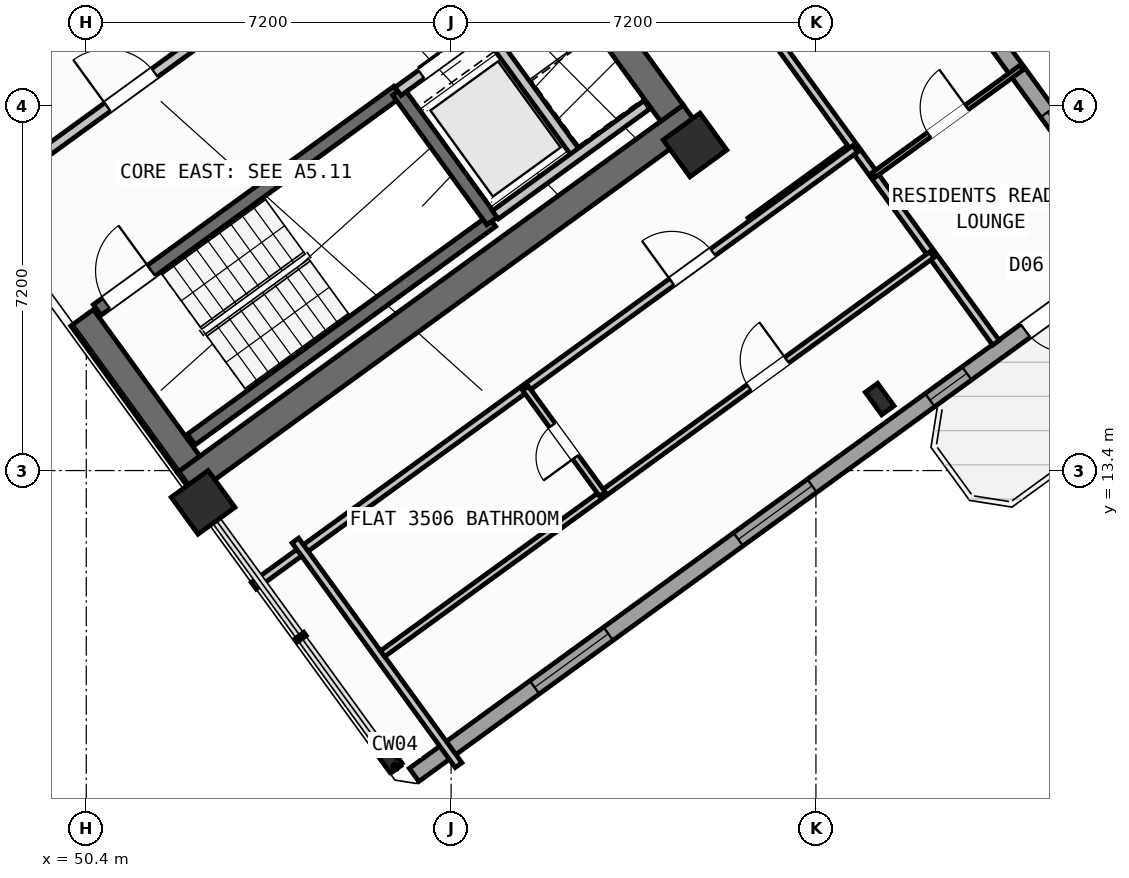
"""IFC4 building model, lengths in metres.
Left out: names, types, materials, properties, quantities, classifications, styles, units other than length and angle.
Written with IfcOpenShell. Run it as: python <this file> out.ifc"""

import sys

from ifc_helpers import new_model, si_unit, direction, frame, frame_2d, origin, origin_2d, place, context, subcontext, project, spatial, rectangle, hollow_rectangle, i_section, extrude, source, transform, mapped, element, fill, save


model = new_model("IFC4")
c1 = context("Model", 3, precision=1e-05, world=origin(), true_north=direction((0.0, 1.0)))
c2 = subcontext(c1, "Body", "Model", "MODEL_VIEW")
j1 = project(units=[si_unit("LENGTHUNIT", "METRE"), si_unit("PLANEANGLEUNIT", "RADIAN")], contexts=[c1])
p1 = place(None, origin())
s1 = spatial("IfcSite", under=j1, at=p1, CompositionType="ELEMENT")
p2 = place(p1, origin())
s2 = spatial("IfcBuilding", under=s1, at=p2, CompositionType="ELEMENT")
p3 = place(p2, frame((0.0, 0.0, 140.7)))
s3 = spatial("IfcBuildingStorey", under=s2, at=p3, CompositionType="ELEMENT", Elevation=140.7)
p4 = place(p3, frame((52.359, 13.14, 0.0), z_axis=(0.0, 0.0, 1.0), x_axis=(0.809014896919, 0.587788139183, 0.0)))
e1 = element("IfcWall", 1, at=p4, inside=s3, PredefinedType="SHEAR", context=c2, shape_type="SweptSolid", body=[
    extrude(rectangle(XDim=12.34, YDim=0.55, at=frame_2d((6.17, 0.0))), origin(), (0.0, 0.0, 1.0), 3.35),
])
for number, where, z_axis, x_axis in (
    (2, (52.42, 13.524, 0.0), (0.0, 0.0, 1.0), (-0.588, 0.809, 0.0)),
    (3, (61.958, 20.454, 0.0), (0.0, 0.0, 1.0), (-0.588, 0.809, 0.0)),
):
    element("IfcWall", number, at=place(p3, frame(where, z_axis=z_axis, x_axis=x_axis)), inside=s3, PredefinedType="SHEAR", context=c2, shape_type="SweptSolid", body=[
        extrude(rectangle(XDim=3.575, YDim=0.55, at=frame_2d((1.788, 0.0))), origin(), (0.0, 0.0, 1.0), 3.35),
    ])
m1 = source(origin(), c2, "Body", "SweptSolid", [
    extrude(i_section(OverallWidth=0.3, OverallDepth=0.55, WebThickness=0.015, FlangeThickness=0.029, at=origin_2d()), origin(), (0.0, 0.0, 1.0), 3.6),
])
p5 = place(p3, frame((56.35, 7.758, 0.0), z_axis=(0.0, 0.0, 1.0), x_axis=(0.809016994375, 0.587785252292, 0.0)))
e4 = element("IfcColumn", 4, at=p5, inside=s3, PredefinedType="COLUMN", context=c2, shape_type="MappedRepresentation", body=[
    mapped(m1, transform((0.0, 0.0, 0.0), scale=1.0)),
])
m2 = source(origin(), c2, "Body", "SweptSolid", [
    extrude(hollow_rectangle(XDim=0.9, YDim=0.9, WallThickness=0.036, at=origin_2d()), origin(), (0.0, 0.0, 1.0), 3.6),
])
p6 = place(p3, frame((52.705, 12.773, 0.0), z_axis=(0.0, 0.0, 1.0), x_axis=(0.809016994375, 0.587785252292, 0.0)))
e5 = element("IfcColumn", 5, at=p6, inside=s3, PredefinedType="COLUMN", context=c2, shape_type="MappedRepresentation", body=[
    mapped(m2, transform((0.0, 0.0, 0.0), scale=1.0)),
])
p7 = place(p3, frame((66.058, 14.811, 0.0), z_axis=(0.0, 0.0, 1.0), x_axis=(0.809016994375, 0.587785252292, 0.0)))
e6 = element("IfcColumn", 6, at=p7, inside=s3, PredefinedType="COLUMN", context=c2, shape_type="MappedRepresentation", body=[
    mapped(m1, transform((0.0, 0.0, 0.0), scale=1.0)),
])
p8 = place(p3, frame((62.414, 19.827, 0.0), z_axis=(0.0, 0.0, 1.0), x_axis=(0.809016994375, 0.587785252292, 0.0)))
e7 = element("IfcColumn", 7, at=p8, inside=s3, PredefinedType="COLUMN", context=c2, shape_type="MappedRepresentation", body=[
    mapped(m2, transform((0.0, 0.0, 0.0), scale=1.0)),
])
p9 = place(p3, frame((58.455, 35.484, 0.0), z_axis=(0.0, 0.0, 1.0), x_axis=(0.587783625747, -0.809018176127, 0.0)))
e8 = element("IfcWall", 8, at=p9, inside=s3, PredefinedType="STANDARD", context=c2, shape_type="SweptSolid", body=[
    extrude(rectangle(XDim=21.587, YDim=0.32, at=frame_2d((10.794, 0.0))), origin(), (0.0, 0.0, 1.0), 2.775),
])
p10 = place(p9, frame((2.994, 0.0, 0.8)))
e9 = element("IfcOpeningElement", 9, at=p10, cuts=e8, PredefinedType="OPENING", context=c2, shape_type="SweptSolid", body=[
    extrude(rectangle(XDim=2.1, YDim=1.55, at=frame_2d((1.05, 0.775))), frame((0.0, 0.17, 0.0), z_axis=(0.0, -1.0, 0.0), x_axis=(1.0, 0.0, 0.0)), (0.0, 0.0, 1.0), 0.34),
])
p11 = place(p9, frame((11.959, 0.0, 0.85)))
e10 = element("IfcOpeningElement", 10, at=p11, cuts=e8, PredefinedType="OPENING", context=c2, shape_type="SweptSolid", body=[
    extrude(rectangle(XDim=1.8, YDim=1.5, at=frame_2d((0.9, 0.75))), frame((0.0, 0.17, 0.0), z_axis=(0.0, -1.0, 0.0), x_axis=(1.0, 0.0, 0.0)), (0.0, 0.0, 1.0), 0.34),
])
p12 = place(p9, frame((18.56, 0.0, 0.85)))
e11 = element("IfcOpeningElement", 11, at=p12, cuts=e8, PredefinedType="OPENING", context=c2, shape_type="SweptSolid", body=[
    extrude(rectangle(XDim=1.5, YDim=1.5, at=frame_2d((0.75, 0.75))), frame((0.0, 0.17, 0.0), z_axis=(0.0, -1.0, 0.0), x_axis=(1.0, 0.0, 0.0)), (0.0, 0.0, 1.0), 0.34),
])
p13 = place(p3, frame((71.098, 17.731, 0.0), z_axis=(0.0, 0.0, 1.0), x_axis=(-0.809021120468, -0.587779573171, 0.0)))
e12 = element("IfcWall", 12, at=p13, inside=s3, PredefinedType="STANDARD", context=c2, shape_type="SweptSolid", body=[
    extrude(rectangle(XDim=17.588, YDim=0.32, at=frame_2d((8.794, 0.0))), origin(), (0.0, 0.0, 1.0), 3.35),
])
p14 = place(p13, frame((1.624, 0.0, 0.0)))
e13 = element("IfcOpeningElement", 13, at=p14, cuts=e12, PredefinedType="OPENING", context=c2, shape_type="SweptSolid", body=[
    extrude(rectangle(XDim=1.05, YDim=2.15, at=frame_2d((0.525, 1.075))), frame((0.0, 0.17, 0.0), z_axis=(0.0, -1.0, 0.0), x_axis=(1.0, 0.0, 0.0)), (0.0, 0.0, 1.0), 0.34),
])
p15 = place(p13, frame((4.104, 0.0, 1.0)))
e14 = element("IfcOpeningElement", 14, at=p15, cuts=e12, PredefinedType="OPENING", context=c2, shape_type="SweptSolid", body=[
    extrude(rectangle(XDim=0.9, YDim=1.25, at=frame_2d((0.45, 0.625))), frame((0.0, 0.17, 0.0), z_axis=(0.0, -1.0, 0.0), x_axis=(1.0, 0.0, 0.0)), (0.0, 0.0, 1.0), 0.34),
])
p16 = place(p13, frame((7.879, 0.0, 0.85)))
e15 = element("IfcOpeningElement", 15, at=p16, cuts=e12, PredefinedType="OPENING", context=c2, shape_type="SweptSolid", body=[
    extrude(rectangle(XDim=1.8, YDim=1.5, at=frame_2d((0.9, 0.75))), frame((0.0, 0.17, 0.0), z_axis=(0.0, -1.0, 0.0), x_axis=(1.0, 0.0, 0.0)), (0.0, 0.0, 1.0), 0.34),
])
p17 = place(p13, frame((12.849, 0.0, 0.85)))
e16 = element("IfcOpeningElement", 16, at=p17, cuts=e12, PredefinedType="OPENING", context=c2, shape_type="SweptSolid", body=[
    extrude(rectangle(XDim=1.8, YDim=1.5, at=frame_2d((0.9, 0.75))), frame((0.0, 0.17, 0.0), z_axis=(0.0, -1.0, 0.0), x_axis=(1.0, 0.0, 0.0)), (0.0, 0.0, 1.0), 0.34),
])
p18 = place(p3, frame((52.472, 14.013, 0.0), z_axis=(0.0, 0.0, 1.0), x_axis=(0.809028366311, 0.587769599847, 0.0)))
e17 = element("IfcWall", 17, at=p18, inside=s3, PredefinedType="SHEAR", context=c2, shape_type="SweptSolid", body=[
    extrude(rectangle(XDim=7.33, YDim=0.26, at=frame_2d((3.665, 0.0))), origin(), (0.0, 0.0, 1.0), 3.35),
])
p19 = place(p3, frame((50.615, 16.57, 0.0), z_axis=(0.0, 0.0, 1.0), x_axis=(0.809028366311, 0.587769599847, 0.0)))
e18 = element("IfcWall", 18, at=p19, inside=s3, PredefinedType="SHEAR", context=c2, shape_type="SweptSolid", body=[
    extrude(rectangle(XDim=7.33, YDim=0.26, at=frame_2d((3.665, 0.0))), origin(), (0.0, 0.0, 1.0), 3.35),
])
p20 = place(p19, frame((0.22, 0.0, 0.0)))
e19 = element("IfcOpeningElement", 19, at=p20, cuts=e18, PredefinedType="OPENING", context=c2, shape_type="SweptSolid", body=[
    extrude(rectangle(XDim=1.1, YDim=2.1, at=frame_2d((0.55, 1.05))), frame((0.0, 0.14, 0.0), z_axis=(0.0, -1.0, 0.0), x_axis=(1.0, 0.0, 0.0)), (0.0, 0.0, 1.0), 0.28),
])
p21 = place(p3, frame((58.41, 18.327, 0.0), z_axis=(0.0, 0.0, 1.0), x_axis=(-0.58776738483, 0.809029975545, 0.0)))
e20 = element("IfcWall", 20, at=p21, inside=s3, PredefinedType="SHEAR", context=c2, shape_type="SweptSolid", body=[
    extrude(rectangle(XDim=3.16, YDim=0.26, at=frame_2d((1.58, 0.0))), origin(), (0.0, 0.0, 1.0), 3.35),
])
p22 = place(p3, frame((47.065, 21.407, 0.0), z_axis=(0.0, 0.0, 1.0), x_axis=(0.809032984992, 0.587763242466, 0.0)))
e21 = element("IfcWall", 21, at=p22, inside=s3, PredefinedType="STANDARD", context=c2, shape_type="SweptSolid", body=[
    extrude(rectangle(XDim=3.448, YDim=0.2, at=frame_2d((1.724, 0.0))), origin(), (0.0, 0.0, 1.0), 3.34),
])
p23 = place(p22, frame((0.458, 0.0, 0.0)))
e22 = element("IfcOpeningElement", 22, at=p23, cuts=e21, PredefinedType="OPENING", context=c2, shape_type="SweptSolid", body=[
    extrude(rectangle(XDim=1.3, YDim=2.2, at=frame_2d((0.65, 1.1))), frame((0.0, 0.11, 0.0), z_axis=(0.0, -1.0, 0.0), x_axis=(1.0, 0.0, 0.0)), (0.0, 0.0, 1.0), 0.22),
])
p24 = place(p3, frame((48.758, 19.077, 0.0), z_axis=(0.0, 0.0, 1.0), x_axis=(0.809005065155, 0.587801671104, 0.0)))
e23 = element("IfcWall", 23, at=p24, inside=s3, PredefinedType="STANDARD", context=c2, shape_type="SweptSolid", body=[
    extrude(rectangle(XDim=5.768, YDim=0.2, at=frame_2d((2.884, 0.0))), origin(), (0.0, 0.0, 1.0), 3.34),
])
p25 = place(p24, frame((2.548, 0.0, 0.0)))
e24 = element("IfcOpeningElement", 24, at=p25, cuts=e23, PredefinedType="OPENING", context=c2, shape_type="SweptSolid", body=[
    extrude(rectangle(XDim=1.15, YDim=2.1, at=frame_2d((0.575, 1.05))), frame((0.0, 0.11, 0.0), z_axis=(0.0, -1.0, 0.0), x_axis=(1.0, 0.0, 0.0)), (0.0, 0.0, 1.0), 0.22),
])
p26 = place(p3, frame((56.553, 20.884, 0.0), z_axis=(0.0, 0.0, 1.0), x_axis=(0.809023564264, 0.58777620951, 0.0)))
e25 = element("IfcWall", 25, at=p26, inside=s3, PredefinedType="STANDARD", context=c2, shape_type="SweptSolid", body=[
    extrude(rectangle(XDim=3.818, YDim=0.2, at=frame_2d((1.909, 0.0))), origin(), (0.0, 0.0, 1.0), 3.34),
])
p27 = place(p26, frame((0.57, 0.0, 0.0)))
e26 = element("IfcOpeningElement", 26, at=p27, cuts=e25, PredefinedType="OPENING", context=c2, shape_type="SweptSolid", body=[
    extrude(rectangle(XDim=1.1, YDim=2.15, at=frame_2d((0.55, 1.075))), frame((0.0, 0.11, 0.0), z_axis=(0.0, -1.0, 0.0), x_axis=(1.0, 0.0, 0.0)), (0.0, 0.0, 1.0), 0.22),
])
p28 = place(p26, frame((2.65, 0.0, 0.0)))
e27 = element("IfcOpeningElement", 27, at=p28, cuts=e25, PredefinedType="OPENING", context=c2, shape_type="SweptSolid", body=[
    extrude(rectangle(XDim=0.86, YDim=2.05, at=frame_2d((0.43, 1.025))), frame((0.0, 0.11, 0.0), z_axis=(0.0, -1.0, 0.0), x_axis=(1.0, 0.0, 0.0)), (0.0, 0.0, 1.0), 0.22),
])
p29 = place(p3, frame((60.067, 19.655, 0.0), z_axis=(0.0, 0.0, 1.0), x_axis=(-0.587800520745, 0.809005900975, 0.0)))
e28 = element("IfcWall", 28, at=p29, inside=s3, PredefinedType="STANDARD", context=c2, shape_type="SweptSolid", body=[
    extrude(rectangle(XDim=2.66, YDim=0.2, at=frame_2d((1.33, 0.0))), origin(), (0.0, 0.0, 1.0), 3.34),
])
p30 = place(p3, frame((58.472, 18.447, 0.0), z_axis=(0.0, 0.0, 1.0), x_axis=(0.809018631237, 0.587782999339, 0.0)))
e29 = element("IfcWall", 29, at=p30, inside=s3, PredefinedType="STANDARD", context=c2, shape_type="SweptSolid", body=[
    extrude(rectangle(XDim=3.698, YDim=0.2, at=frame_2d((1.849, 0.0))), origin(), (0.0, 0.0, 1.0), 3.34),
])
p31 = place(p3, frame((63.507, 18.322, 0.0), z_axis=(0.0, 0.0, 1.0), x_axis=(0.809034604122, 0.587761013791, 0.0)))
e30 = element("IfcWall", 30, at=p31, inside=s3, PredefinedType="PARTITIONING", context=c2, shape_type="SweptSolid", body=[
    extrude(rectangle(XDim=2.51, YDim=0.16, at=frame_2d((1.255, 0.0))), origin(), (0.0, 0.0, 1.0), 3.34),
])
p32 = place(p3, frame((68.353, 15.922, 0.0), z_axis=(0.0, 0.0, 1.0), x_axis=(-0.587783168305, 0.809018508476, 0.0)))
e31 = element("IfcWall", 31, at=p32, inside=s3, PredefinedType="PARTITIONING", context=c2, shape_type="SweptSolid", body=[
    extrude(rectangle(XDim=10.65, YDim=0.16, at=frame_2d((5.325, 0.0))), origin(), (0.0, 0.0, 1.0), 3.34),
])
p33 = place(p3, frame((65.944, 19.238, 0.0), z_axis=(0.0, 0.0, 1.0), x_axis=(0.809013833588, 0.587789602718, 0.0)))
e32 = element("IfcWall", 32, at=p33, inside=s3, PredefinedType="PARTITIONING", context=c2, shape_type="SweptSolid", body=[
    extrude(rectangle(XDim=3.61, YDim=0.11, at=frame_2d((1.805, 0.0))), origin(), (0.0, 0.0, 1.0), 3.34),
])
p34 = place(p33, frame((1.345, 0.0, 0.0)))
e33 = element("IfcOpeningElement", 33, at=p34, cuts=e32, PredefinedType="OPENING", context=c2, shape_type="SweptSolid", body=[
    extrude(rectangle(XDim=0.92, YDim=2.08, at=frame_2d((0.46, 1.04))), frame((0.0, 0.065, 0.0), z_axis=(0.0, -1.0, 0.0), x_axis=(1.0, 0.0, 0.0)), (0.0, 0.0, 1.0), 0.13),
])
p35 = place(p3, frame((53.705, 11.126, 0.0), z_axis=(0.0, 0.0, 1.0), x_axis=(0.809014504436, 0.587788679384, 0.0)))
e34 = element("IfcWall", 34, at=p35, inside=s3, PredefinedType="PARTITIONING", context=c2, shape_type="SweptSolid", body=[
    extrude(rectangle(XDim=14.67, YDim=0.16, at=frame_2d((7.335, 0.0))), origin(), (0.0, 0.0, 1.0), 3.34),
])
p36 = place(p35, frame((10.2, 0.0, 0.0)))
e35 = element("IfcOpeningElement", 35, at=p36, cuts=e34, PredefinedType="OPENING", context=c2, shape_type="SweptSolid", body=[
    extrude(rectangle(XDim=1.0, YDim=2.1, at=frame_2d((0.5, 1.05))), frame((0.0, 0.09, 0.0), z_axis=(0.0, -1.0, 0.0), x_axis=(1.0, 0.0, 0.0)), (0.0, 0.0, 1.0), 0.18),
])
p37 = place(p3, frame((57.747, 7.586, 0.0), z_axis=(0.0, 0.0, 1.0), x_axis=(-0.587784893399, 0.809017255126, 0.0)))
e36 = element("IfcWall", 36, at=p37, inside=s3, PredefinedType="PARTITIONING", context=c2, shape_type="SweptSolid", body=[
    extrude(rectangle(XDim=5.48, YDim=0.16, at=frame_2d((2.74, 0.0))), origin(), (0.0, 0.0, 1.0), 3.34),
])
p38 = place(p3, frame((56.249, 9.785, 0.0), z_axis=(0.0, 0.0, 1.0), x_axis=(0.809011747655, 0.587792473715, 0.0)))
e37 = element("IfcWall", 37, at=p38, inside=s3, PredefinedType="PLUMBINGWALL", context=c2, shape_type="SweptSolid", body=[
    extrude(rectangle(XDim=13.4, YDim=0.14, at=frame_2d((6.7, 0.0))), origin(), (0.0, 0.0, 1.0), 3.34),
])
p39 = place(p38, frame((8.94, 0.0, 0.0)))
e38 = element("IfcOpeningElement", 38, at=p39, cuts=e37, PredefinedType="OPENING", context=c2, shape_type="SweptSolid", body=[
    extrude(rectangle(XDim=0.92, YDim=2.08, at=frame_2d((0.46, 1.04))), frame((0.0, 0.08, 0.0), z_axis=(0.0, -1.0, 0.0), x_axis=(1.0, 0.0, 0.0)), (0.0, 0.0, 1.0), 0.16),
])
p40 = place(p3, frame((60.585, 12.936, 0.0), z_axis=(0.0, 0.0, 1.0), x_axis=(-0.587772116736, 0.809026537752, 0.0)))
e39 = element("IfcWall", 39, at=p40, inside=s3, PredefinedType="PLUMBINGWALL", context=c2, shape_type="SweptSolid", body=[
    extrude(rectangle(XDim=2.58, YDim=0.14, at=frame_2d((1.29, 0.0))), origin(), (0.0, 0.0, 1.0), 3.34),
])
p41 = place(p40, frame((0.9, 0.0, 0.0)))
e40 = element("IfcOpeningElement", 40, at=p41, cuts=e39, PredefinedType="OPENING", context=c2, shape_type="SweptSolid", body=[
    extrude(rectangle(XDim=0.78, YDim=2.05, at=frame_2d((0.39, 1.025))), frame((0.0, 0.08, 0.0), z_axis=(0.0, -1.0, 0.0), x_axis=(1.0, 0.0, 0.0)), (0.0, 0.0, 1.0), 0.16),
])
m3 = source(origin(), c2, "Body", "SweptSolid", [
    extrude(rectangle(XDim=1.05, YDim=2.15, at=frame_2d((0.525, 1.075))), frame((0.0, 0.025, 0.0), z_axis=(0.0, -1.0, 0.0), x_axis=(1.0, 0.0, 0.0)), (0.0, 0.0, 1.0), 0.05),
])
p42 = place(p14, origin())
e41 = element("IfcDoor", 41, at=p42, inside=s3, OperationType="SINGLE_SWING_LEFT", PredefinedType="DOOR", context=c2, shape_type="MappedRepresentation", body=[
    mapped(m3, transform((0.0, 0.0, 0.0), scale=1.0)),
])
fill(e13, e41)
m4 = source(origin(), c2, "Body", "SweptSolid", [
    extrude(rectangle(XDim=1.5, YDim=1.5, at=frame_2d((0.75, 0.75))), frame((0.0, 0.03, 0.0), z_axis=(0.0, -1.0, 0.0), x_axis=(1.0, 0.0, 0.0)), (0.0, 0.0, 1.0), 0.06),
])
p43 = place(p12, origin())
e42 = element("IfcWindow", 42, at=p43, inside=s3, PartitioningType="SINGLE_PANEL", PredefinedType="WINDOW", context=c2, shape_type="MappedRepresentation", body=[
    mapped(m4, transform((0.0, 0.0, 0.0), scale=1.0)),
])
fill(e11, e42)
m5 = source(origin(), c2, "Body", "SweptSolid", [
    extrude(rectangle(XDim=0.9, YDim=1.25, at=frame_2d((0.45, 0.625))), frame((0.0, 0.03, 0.0), z_axis=(0.0, -1.0, 0.0), x_axis=(1.0, 0.0, 0.0)), (0.0, 0.0, 1.0), 0.06),
])
p44 = place(p15, origin())
e43 = element("IfcWindow", 43, at=p44, inside=s3, PartitioningType="SINGLE_PANEL", PredefinedType="WINDOW", context=c2, shape_type="MappedRepresentation", body=[
    mapped(m5, transform((0.0, 0.0, 0.0), scale=1.0)),
])
fill(e14, e43)
m6 = source(origin(), c2, "Body", "SweptSolid", [
    extrude(rectangle(XDim=1.8, YDim=1.5, at=frame_2d((0.9, 0.75))), frame((0.0, 0.03, 0.0), z_axis=(0.0, -1.0, 0.0), x_axis=(1.0, 0.0, 0.0)), (0.0, 0.0, 1.0), 0.06),
])
p45 = place(p16, origin())
e44 = element("IfcWindow", 44, at=p45, inside=s3, PartitioningType="SINGLE_PANEL", PredefinedType="WINDOW", context=c2, shape_type="MappedRepresentation", body=[
    mapped(m6, transform((0.0, 0.0, 0.0), scale=1.0)),
])
fill(e15, e44)
p46 = place(p17, origin())
e45 = element("IfcWindow", 45, at=p46, inside=s3, PartitioningType="SINGLE_PANEL", PredefinedType="WINDOW", context=c2, shape_type="MappedRepresentation", body=[
    mapped(m6, transform((0.0, 0.0, 0.0), scale=1.0)),
])
fill(e16, e45)
m7 = source(origin(), c2, "Body", "SweptSolid", [
    extrude(rectangle(XDim=1.1, YDim=2.1, at=frame_2d((0.55, 1.05))), frame((0.0, 0.025, 0.0), z_axis=(0.0, -1.0, 0.0), x_axis=(1.0, 0.0, 0.0)), (0.0, 0.0, 1.0), 0.05),
])
p47 = place(p20, origin())
e46 = element("IfcDoor", 46, at=p47, inside=s3, OperationType="SINGLE_SWING_RIGHT", PredefinedType="DOOR", context=c2, shape_type="MappedRepresentation", body=[
    mapped(m7, transform((0.0, 0.0, 0.0), scale=1.0)),
])
fill(e19, e46)
m8 = source(origin(), c2, "Body", "SweptSolid", [
    extrude(rectangle(XDim=1.15, YDim=2.1, at=frame_2d((0.575, 1.05))), frame((0.0, 0.025, 0.0), z_axis=(0.0, -1.0, 0.0), x_axis=(1.0, 0.0, 0.0)), (0.0, 0.0, 1.0), 0.05),
])
p48 = place(p25, origin())
e47 = element("IfcDoor", 47, at=p48, inside=s3, OperationType="SINGLE_SWING_LEFT", PredefinedType="DOOR", context=c2, shape_type="MappedRepresentation", body=[
    mapped(m8, transform((0.0, 0.0, 0.0), scale=1.0)),
])
fill(e24, e47)
m9 = source(origin(), c2, "Body", "SweptSolid", [
    extrude(rectangle(XDim=1.1, YDim=2.15, at=frame_2d((0.55, 1.075))), frame((0.0, 0.025, 0.0), z_axis=(0.0, -1.0, 0.0), x_axis=(1.0, 0.0, 0.0)), (0.0, 0.0, 1.0), 0.05),
])
p49 = place(p27, origin())
e48 = element("IfcDoor", 48, at=p49, inside=s3, OperationType="DOUBLE_DOOR_SLIDING", PredefinedType="DOOR", context=c2, shape_type="MappedRepresentation", body=[
    mapped(m9, transform((0.0, 0.0, 0.0), scale=1.0)),
])
fill(e26, e48)
m10 = source(origin(), c2, "Body", "SweptSolid", [
    extrude(rectangle(XDim=0.92, YDim=2.08, at=frame_2d((0.46, 1.04))), frame((0.0, 0.025, 0.0), z_axis=(0.0, -1.0, 0.0), x_axis=(1.0, 0.0, 0.0)), (0.0, 0.0, 1.0), 0.05),
])
p50 = place(p34, origin())
e49 = element("IfcDoor", 49, at=p50, inside=s3, OperationType="SINGLE_SWING_RIGHT", PredefinedType="DOOR", context=c2, shape_type="MappedRepresentation", body=[
    mapped(m10, transform((0.0, 0.0, 0.0), scale=1.0)),
])
fill(e33, e49)
m11 = source(origin(), c2, "Body", "SweptSolid", [
    extrude(rectangle(XDim=1.0, YDim=2.1, at=frame_2d((0.5, 1.05))), frame((0.0, 0.025, 0.0), z_axis=(0.0, -1.0, 0.0), x_axis=(1.0, 0.0, 0.0)), (0.0, 0.0, 1.0), 0.05),
])
p51 = place(p36, origin())
e50 = element("IfcDoor", 50, at=p51, inside=s3, OperationType="SINGLE_SWING_LEFT", PredefinedType="DOOR", context=c2, shape_type="MappedRepresentation", body=[
    mapped(m11, transform((0.0, 0.0, 0.0), scale=1.0)),
])
fill(e35, e50)
p52 = place(p39, origin())
e51 = element("IfcDoor", 51, at=p52, inside=s3, OperationType="SINGLE_SWING_RIGHT", PredefinedType="DOOR", context=c2, shape_type="MappedRepresentation", body=[
    mapped(m10, transform((0.0, 0.0, 0.0), scale=1.0)),
])
fill(e38, e51)
m12 = source(origin(), c2, "Body", "SweptSolid", [
    extrude(rectangle(XDim=0.78, YDim=2.05, at=frame_2d((0.39, 1.025))), frame((0.0, 0.025, 0.0), z_axis=(0.0, -1.0, 0.0), x_axis=(1.0, 0.0, 0.0)), (0.0, 0.0, 1.0), 0.05),
])
p53 = place(p41, origin())
e52 = element("IfcDoor", 52, at=p53, inside=s3, OperationType="SINGLE_SWING_LEFT", PredefinedType="DOOR", context=c2, shape_type="MappedRepresentation", body=[
    mapped(m12, transform((0.0, 0.0, 0.0), scale=1.0)),
])
fill(e40, e52)
save(model, sys.argv[1])
